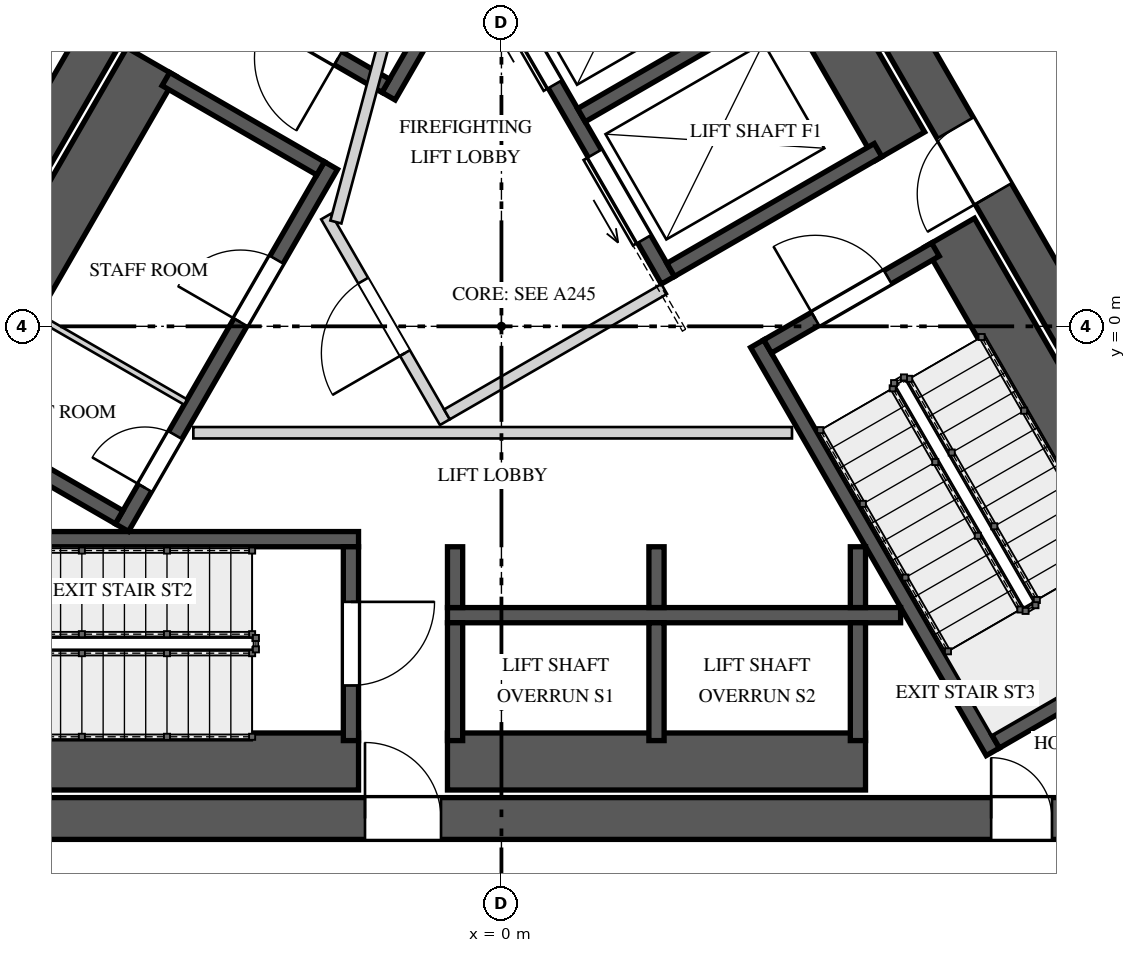
"""IFC4 building model, lengths in metres.
Left out: names, types, materials, properties, quantities, classifications, styles, units other than length and angle.
Written with IfcOpenShell. Run it as: python <this file> out.ifc"""

import sys

from ifc_helpers import new_model, si_unit, direction, frame, frame_2d, origin, place, context, subcontext, project, spatial, rectangle, extrude, element, fill, save


model = new_model("IFC4")
c1 = context("Model", 3, precision=1e-05, world=origin(), true_north=direction((0.0, 1.0)))
c2 = subcontext(c1, "Body", "Model", "MODEL_VIEW")
j1 = project(units=[si_unit("LENGTHUNIT", "METRE"), si_unit("PLANEANGLEUNIT", "RADIAN")], contexts=[c1])
p1 = place(None, origin())
s1 = spatial("IfcSite", under=j1, at=p1, CompositionType="ELEMENT")
p2 = place(p1, origin())
s2 = spatial("IfcBuilding", under=s1, at=p2, CompositionType="ELEMENT")
p3 = place(p2, frame((0.0, 0.0, 352.4)))
s3 = spatial("IfcBuildingStorey", under=s2, at=p3, CompositionType="ELEMENT", Elevation=352.4)
p4 = place(p3, frame((-1.285, 10.725, 0.0), z_axis=(0.0, 0.0, 1.0), x_axis=(-0.499994590896, -0.86602852671, 0.0)))
e1 = element("IfcWall", 1, at=p4, inside=s3, PredefinedType="SHEAR", context=c2, shape_type="SweptSolid", body=[
    extrude(rectangle(XDim=17.292, YDim=0.55, at=frame_2d((8.646, 0.0))), origin(), (0.0, 0.0, 1.0), 4.5),
])
p5 = place(p4, frame((6.851, 0.0, 0.0)))
e2 = element("IfcOpeningElement", 2, at=p5, cuts=e1, PredefinedType="OPENING", context=c2, shape_type="SweptSolid", body=[
    extrude(rectangle(XDim=1.0, YDim=2.4, at=frame_2d((0.5, 1.2))), frame((0.0, 0.285, 0.0), z_axis=(0.0, -1.0, 0.0), x_axis=(1.0, 0.0, 0.0)), (0.0, 0.0, 1.0), 0.57),
])
p6 = place(p3, frame((-8.646, -6.475, 0.0), z_axis=(0.0, 0.0, 1.0), x_axis=(1.0, 0.0, 0.0)))
e3 = element("IfcWall", 3, at=p6, inside=s3, PredefinedType="SHEAR", context=c2, shape_type="SweptSolid", body=[
    extrude(rectangle(XDim=17.292, YDim=0.55, at=frame_2d((8.646, 0.0))), origin(), (0.0, 0.0, 1.0), 4.5),
])
p7 = place(p6, frame((6.851, 0.0, 0.0)))
e4 = element("IfcOpeningElement", 4, at=p7, cuts=e3, PredefinedType="OPENING", context=c2, shape_type="SweptSolid", body=[
    extrude(rectangle(XDim=1.0, YDim=2.4, at=frame_2d((0.5, 1.2))), frame((0.0, 0.285, 0.0), z_axis=(0.0, -1.0, 0.0), x_axis=(1.0, 0.0, 0.0)), (0.0, 0.0, 1.0), 0.57),
])
p8 = place(p6, frame((15.089, 0.0, 0.0)))
e5 = element("IfcOpeningElement", 5, at=p8, cuts=e3, PredefinedType="OPENING", context=c2, shape_type="SweptSolid", body=[
    extrude(rectangle(XDim=0.8, YDim=2.1, at=frame_2d((0.4, 1.05))), frame((0.0, 0.285, 0.0), z_axis=(0.0, -1.0, 0.0), x_axis=(1.0, 0.0, 0.0)), (0.0, 0.0, 1.0), 0.57),
])
p9 = place(p3, frame((9.93, -4.25, 0.0), z_axis=(0.0, 0.0, 1.0), x_axis=(-0.499994590896, 0.86602852671, 0.0)))
e6 = element("IfcWall", 6, at=p9, inside=s3, PredefinedType="SHEAR", context=c2, shape_type="SweptSolid", body=[
    extrude(rectangle(XDim=17.292, YDim=0.55, at=frame_2d((8.646, 0.0))), origin(), (0.0, 0.0, 1.0), 4.5),
])
p10 = place(p9, frame((6.921, 0.0, 0.0)))
e7 = element("IfcOpeningElement", 7, at=p10, cuts=e6, PredefinedType="OPENING", context=c2, shape_type="SweptSolid", body=[
    extrude(rectangle(XDim=1.0, YDim=2.4, at=frame_2d((0.5, 1.2))), frame((0.0, 0.285, 0.0), z_axis=(0.0, -1.0, 0.0), x_axis=(1.0, 0.0, 0.0)), (0.0, 0.0, 1.0), 0.57),
])
p11 = place(p9, frame((14.626, 0.0, 0.0)))
e8 = element("IfcOpeningElement", 8, at=p11, cuts=e6, PredefinedType="OPENING", context=c2, shape_type="SweptSolid", body=[
    extrude(rectangle(XDim=0.8, YDim=2.1, at=frame_2d((0.4, 1.05))), frame((0.0, 0.285, 0.0), z_axis=(0.0, -1.0, 0.0), x_axis=(1.0, 0.0, 0.0)), (0.0, 0.0, 1.0), 0.57),
])
p12 = place(p3, frame((1.615, 8.397, 0.0), z_axis=(0.0, 0.0, 1.0), x_axis=(-0.500009909098, -0.866019682689, 0.0)))
e9 = element("IfcWall", 9, at=p12, inside=s3, PredefinedType="SOLIDWALL", context=c2, shape_type="SweptSolid", body=[
    extrude(rectangle(XDim=6.2, YDim=0.2, at=frame_2d((3.1, 0.0))), origin(), (0.0, 0.0, 1.0), 4.15),
])
p13 = place(p3, frame((-1.521, 3.165, 0.0), z_axis=(0.0, 0.0, 1.0), x_axis=(-0.866030925526, 0.499990435942, 0.0)))
e10 = element("IfcWall", 10, at=p13, inside=s3, PredefinedType="SOLIDWALL", context=c2, shape_type="SweptSolid", body=[
    extrude(rectangle(XDim=2.55, YDim=0.2, at=frame_2d((1.275, 0.0))), origin(), (0.0, 0.0, 1.0), 4.15),
])
p14 = place(p13, frame((0.725, 0.0, 0.0)))
e11 = element("IfcOpeningElement", 11, at=p14, cuts=e10, PredefinedType="OPENING", context=c2, shape_type="SweptSolid", body=[
    extrude(rectangle(XDim=1.1, YDim=2.4, at=frame_2d((0.55, 1.2))), frame((0.0, 0.11, 0.0), z_axis=(0.0, -1.0, 0.0), x_axis=(1.0, 0.0, 0.0)), (0.0, 0.0, 1.0), 0.22),
])
p15 = place(p3, frame((-8.08, -5.725, 0.0), z_axis=(0.0, 0.0, 1.0), x_axis=(1.0, 0.0, 0.0)))
e12 = element("IfcWall", 12, at=p15, inside=s3, PredefinedType="SOLIDWALL", context=c2, shape_type="SweptSolid", body=[
    extrude(rectangle(XDim=6.2, YDim=0.75, at=frame_2d((3.1, 0.0))), origin(), (0.0, 0.0, 1.0), 4.15),
])
p16 = place(p3, frame((-8.08, -2.8, 0.0), z_axis=(0.0, 0.0, 1.0), x_axis=(1.0, 0.0, 0.0)))
e13 = element("IfcWall", 13, at=p16, inside=s3, PredefinedType="SOLIDWALL", context=c2, shape_type="SweptSolid", body=[
    extrude(rectangle(XDim=6.2, YDim=0.2, at=frame_2d((3.1, 0.0))), origin(), (0.0, 0.0, 1.0), 4.15),
])
p17 = place(p3, frame((-1.98, -2.9, 0.0), z_axis=(0.0, 0.0, 1.0), x_axis=(0.0, -1.0, 0.0)))
e14 = element("IfcWall", 14, at=p17, inside=s3, PredefinedType="SOLIDWALL", context=c2, shape_type="SweptSolid", body=[
    extrude(rectangle(XDim=2.55, YDim=0.2, at=frame_2d((1.275, 0.0))), origin(), (0.0, 0.0, 1.0), 4.15),
])
p18 = place(p17, frame((0.725, 0.0, 0.0)))
e15 = element("IfcOpeningElement", 15, at=p18, cuts=e14, PredefinedType="OPENING", context=c2, shape_type="SweptSolid", body=[
    extrude(rectangle(XDim=1.1, YDim=2.4, at=frame_2d((0.55, 1.2))), frame((0.0, 0.11, 0.0), z_axis=(0.0, -1.0, 0.0), x_axis=(1.0, 0.0, 0.0)), (0.0, 0.0, 1.0), 0.22),
])
p19 = place(p3, frame((8.998, -4.135, 0.0), z_axis=(0.0, 0.0, 1.0), x_axis=(-0.500009909098, 0.866019682689, 0.0)))
e16 = element("IfcWall", 16, at=p19, inside=s3, PredefinedType="SOLIDWALL", context=c2, shape_type="SweptSolid", body=[
    extrude(rectangle(XDim=6.2, YDim=0.75, at=frame_2d((3.1, 0.0))), origin(), (0.0, 0.0, 1.0), 4.15),
])
p20 = place(p3, frame((6.465, -5.597, 0.0), z_axis=(0.0, 0.0, 1.0), x_axis=(-0.49998037582, 0.866036733513, 0.0)))
e17 = element("IfcWall", 17, at=p20, inside=s3, PredefinedType="SOLIDWALL", context=c2, shape_type="SweptSolid", body=[
    extrude(rectangle(XDim=6.2, YDim=0.2, at=frame_2d((3.1, 0.0))), origin(), (0.0, 0.0, 1.0), 4.15),
])
p21 = place(p3, frame((6.501, -5.461, 0.0), z_axis=(0.0, 0.0, 1.0), x_axis=(0.865989465428, 0.500062241894, 0.0)))
e18 = element("IfcWall", 18, at=p21, inside=s3, PredefinedType="SOLIDWALL", context=c2, shape_type="SweptSolid", body=[
    extrude(rectangle(XDim=2.55, YDim=0.2, at=frame_2d((1.275, 0.0))), origin(), (0.0, 0.0, 1.0), 4.15),
])
p22 = place(p3, frame((3.501, -0.265, 0.0), z_axis=(0.0, 0.0, 1.0), x_axis=(0.866030925526, 0.499990435942, 0.0)))
e19 = element("IfcWall", 19, at=p22, inside=s3, PredefinedType="SOLIDWALL", context=c2, shape_type="SweptSolid", body=[
    extrude(rectangle(XDim=2.55, YDim=0.2, at=frame_2d((1.275, 0.0))), origin(), (0.0, 0.0, 1.0), 4.15),
])
p23 = place(p22, frame((0.725, 0.0, 0.0)))
e20 = element("IfcOpeningElement", 20, at=p23, cuts=e19, PredefinedType="OPENING", context=c2, shape_type="SweptSolid", body=[
    extrude(rectangle(XDim=1.1, YDim=2.4, at=frame_2d((0.55, 1.2))), frame((0.0, 0.11, 0.0), z_axis=(0.0, -1.0, 0.0), x_axis=(1.0, 0.0, 0.0)), (0.0, 0.0, 1.0), 0.22),
])
p24 = place(p3, frame((-4.993, -2.648, 0.0), z_axis=(0.0, 0.0, 1.0), x_axis=(0.499996545922, 0.866027397988, 0.0)))
e21 = element("IfcWall", 21, at=p24, inside=s3, PredefinedType="SOLIDWALL", context=c2, shape_type="SweptSolid", body=[
    extrude(rectangle(XDim=5.5, YDim=0.2, at=frame_2d((2.75, 0.0))), origin(), (0.0, 0.0, 1.0), 4.15),
])
p25 = place(p24, frame((3.12, 0.0, 0.0)))
e22 = element("IfcOpeningElement", 22, at=p25, cuts=e21, PredefinedType="OPENING", context=c2, shape_type="SweptSolid", body=[
    extrude(rectangle(XDim=0.95, YDim=2.4, at=frame_2d((0.475, 1.2))), frame((0.0, 0.11, 0.0), z_axis=(0.0, -1.0, 0.0), x_axis=(1.0, 0.0, 0.0)), (0.0, 0.0, 1.0), 0.22),
])
p26 = place(p24, frame((0.605, 0.0, 0.0)))
e23 = element("IfcOpeningElement", 23, at=p26, cuts=e21, PredefinedType="OPENING", context=c2, shape_type="SweptSolid", body=[
    extrude(rectangle(XDim=0.8, YDim=2.1, at=frame_2d((0.4, 1.05))), frame((0.0, 0.11, 0.0), z_axis=(0.0, -1.0, 0.0), x_axis=(1.0, 0.0, 0.0)), (0.0, 0.0, 1.0), 0.22),
])
p27 = place(p3, frame((-4.603, 3.477, 0.0), z_axis=(0.0, 0.0, 1.0), x_axis=(-0.500015767406, -0.866016300277, 0.0)))
e24 = element("IfcWall", 24, at=p27, inside=s3, PredefinedType="SOLIDWALL", context=c2, shape_type="SweptSolid", body=[
    extrude(rectangle(XDim=5.5, YDim=0.75, at=frame_2d((2.75, 0.0))), origin(), (0.0, 0.0, 1.0), 4.15),
])
p28 = place(p3, frame((-2.38, 2.078, 0.0), z_axis=(0.0, 0.0, 1.0), x_axis=(-0.866061024631, 0.499938297808, 0.0)))
e25 = element("IfcWall", 25, at=p28, inside=s3, PredefinedType="SOLIDWALL", context=c2, shape_type="SweptSolid", body=[
    extrude(rectangle(XDim=2.35, YDim=0.2, at=frame_2d((1.175, 0.0))), origin(), (0.0, 0.0, 1.0), 4.15),
])
p29 = place(p3, frame((-5.03, -2.512, 0.0), z_axis=(0.0, 0.0, 1.0), x_axis=(-0.866016039709, 0.500016218704, 0.0)))
e26 = element("IfcWall", 26, at=p29, inside=s3, PredefinedType="SOLIDWALL", context=c2, shape_type="SweptSolid", body=[
    extrude(rectangle(XDim=2.35, YDim=0.2, at=frame_2d((1.175, 0.0))), origin(), (0.0, 0.0, 1.0), 4.15),
])
p30 = place(p3, frame((-4.155, -0.996, 0.0), z_axis=(0.0, 0.0, 1.0), x_axis=(-0.866016039709, 0.500016218704, 0.0)))
e27 = element("IfcWall", 27, at=p30, inside=s3, PredefinedType="PARTITIONING", context=c2, shape_type="SweptSolid", body=[
    extrude(rectangle(XDim=2.35, YDim=0.08, at=frame_2d((1.175, 0.0))), origin(), (0.0, 0.0, 1.0), 4.15),
])
p31 = place(p3, frame((-0.71, -3.8, 0.0), z_axis=(0.0, 0.0, 1.0), x_axis=(1.0, 0.0, 0.0)))
e28 = element("IfcWall", 28, at=p31, inside=s3, PredefinedType="SOLIDWALL", context=c2, shape_type="SweptSolid", body=[
    extrude(rectangle(XDim=5.961, YDim=0.2, at=frame_2d((2.981, 0.0))), origin(), (0.0, 0.0, 1.0), 4.15),
])
p32 = place(p3, frame((-0.71, -5.725, 0.0), z_axis=(0.0, 0.0, 1.0), x_axis=(1.0, 0.0, 0.0)))
e29 = element("IfcWall", 29, at=p32, inside=s3, PredefinedType="SOLIDWALL", context=c2, shape_type="SweptSolid", body=[
    extrude(rectangle(XDim=5.5, YDim=0.75, at=frame_2d((2.75, 0.0))), origin(), (0.0, 0.0, 1.0), 4.15),
])
p33 = place(p3, frame((-0.61, -3.9, 0.0), z_axis=(0.0, 0.0, 1.0), x_axis=(0.0, -1.0, 0.0)))
e30 = element("IfcWall", 30, at=p33, inside=s3, PredefinedType="SOLIDWALL", context=c2, shape_type="SweptSolid", body=[
    extrude(rectangle(XDim=1.55, YDim=0.2, at=frame_2d((0.775, 0.0))), origin(), (0.0, 0.0, 1.0), 4.15),
])
p34 = place(p3, frame((-0.61, -2.9, 0.0), z_axis=(0.0, 0.0, 1.0), x_axis=(0.0, -1.0, 0.0)))
e31 = element("IfcWall", 31, at=p34, inside=s3, PredefinedType="SOLIDWALL", context=c2, shape_type="SweptSolid", body=[
    extrude(rectangle(XDim=0.8, YDim=0.2, at=frame_2d((0.4, 0.0))), origin(), (0.0, 0.0, 1.0), 4.15),
])
p35 = place(p3, frame((2.04, -3.9, 0.0), z_axis=(0.0, 0.0, 1.0), x_axis=(0.0, -1.0, 0.0)))
e32 = element("IfcWall", 32, at=p35, inside=s3, PredefinedType="SOLIDWALL", context=c2, shape_type="SweptSolid", body=[
    extrude(rectangle(XDim=1.55, YDim=0.2, at=frame_2d((0.775, 0.0))), origin(), (0.0, 0.0, 1.0), 4.15),
])
p36 = place(p3, frame((2.04, -2.9, 0.0), z_axis=(0.0, 0.0, 1.0), x_axis=(0.0, -1.0, 0.0)))
e33 = element("IfcWall", 33, at=p36, inside=s3, PredefinedType="SOLIDWALL", context=c2, shape_type="SweptSolid", body=[
    extrude(rectangle(XDim=0.8, YDim=0.2, at=frame_2d((0.4, 0.0))), origin(), (0.0, 0.0, 1.0), 4.15),
])
p37 = place(p3, frame((4.69, -3.9, 0.0), z_axis=(0.0, 0.0, 1.0), x_axis=(0.0, -1.0, 0.0)))
e34 = element("IfcWall", 34, at=p37, inside=s3, PredefinedType="SOLIDWALL", context=c2, shape_type="SweptSolid", body=[
    extrude(rectangle(XDim=1.55, YDim=0.2, at=frame_2d((0.775, 0.0))), origin(), (0.0, 0.0, 1.0), 4.15),
])
p38 = place(p3, frame((4.69, -2.9, 0.0), z_axis=(0.0, 0.0, 1.0), x_axis=(0.0, -1.0, 0.0)))
e35 = element("IfcWall", 35, at=p38, inside=s3, PredefinedType="SOLIDWALL", context=c2, shape_type="SweptSolid", body=[
    extrude(rectangle(XDim=0.8, YDim=0.2, at=frame_2d((0.4, 0.0))), origin(), (0.0, 0.0, 1.0), 4.15),
])
p39 = place(p3, frame((2.19, 0.606, 0.0), z_axis=(0.0, 0.0, 1.0), x_axis=(-0.500002801628, 0.866023786258, 0.0)))
e36 = element("IfcWall", 36, at=p39, inside=s3, PredefinedType="SOLIDWALL", context=c2, shape_type="SweptSolid", body=[
    extrude(rectangle(XDim=4.9, YDim=0.2, at=frame_2d((2.45, 0.0))), origin(), (0.0, 0.0, 1.0), 4.15),
])
p40 = place(p39, frame((0.625, 0.0, 0.0)))
e37 = element("IfcOpeningElement", 37, at=p40, cuts=e36, PredefinedType="OPENING", context=c2, shape_type="SweptSolid", body=[
    extrude(rectangle(XDim=1.3, YDim=2.1, at=frame_2d((0.65, 1.05))), frame((0.0, 0.11, 0.0), z_axis=(0.0, -1.0, 0.0), x_axis=(1.0, 0.0, 0.0)), (0.0, 0.0, 1.0), 0.22),
])
p41 = place(p39, frame((2.975, 0.0, 0.0)))
e38 = element("IfcOpeningElement", 38, at=p41, cuts=e36, PredefinedType="OPENING", context=c2, shape_type="SweptSolid", body=[
    extrude(rectangle(XDim=1.3, YDim=2.1, at=frame_2d((0.65, 1.05))), frame((0.0, 0.11, 0.0), z_axis=(0.0, -1.0, 0.0), x_axis=(1.0, 0.0, 0.0)), (0.0, 0.0, 1.0), 0.22),
])
p42 = place(p3, frame((5.243, 2.369, 0.0), z_axis=(0.0, 0.0, 1.0), x_axis=(-0.500002801628, 0.866023786258, 0.0)))
e39 = element("IfcWall", 39, at=p42, inside=s3, PredefinedType="SOLIDWALL", context=c2, shape_type="SweptSolid", body=[
    extrude(rectangle(XDim=4.9, YDim=0.75, at=frame_2d((2.45, 0.0))), origin(), (0.0, 0.0, 1.0), 4.15),
])
for number, where, z_axis, x_axis in (
    (40, (2.227, 0.743, 0.0), (0.0, 0.0, 1.0), (0.866, 0.5, 0.0)),
    (41, (1.052, 2.778, 0.0), (0.0, 0.0, 1.0), (0.866, 0.5, 0.0)),
):
    element("IfcWall", number, at=place(p3, frame(where, z_axis=z_axis, x_axis=x_axis)), inside=s3, PredefinedType="SOLIDWALL", context=c2, shape_type="SweptSolid", body=[
        extrude(rectangle(XDim=3.15, YDim=0.2, at=frame_2d((1.575, 0.0))), origin(), (0.0, 0.0, 1.0), 4.15),
    ])
p43 = place(p3, frame((-0.744, -1.261, 0.0), z_axis=(0.0, 0.0, 1.0), x_axis=(-0.500004234368, 0.866022959057, 0.0)))
e42 = element("IfcWall", 42, at=p43, inside=s3, PredefinedType="PARTITIONING", context=c2, shape_type="SweptSolid", body=[
    extrude(rectangle(XDim=3.125, YDim=0.15, at=frame_2d((1.562, 0.0))), origin(), (0.0, 0.0, 1.0), 4.15),
])
p44 = place(p43, frame((1.05, 0.0, 0.0)))
e43 = element("IfcOpeningElement", 43, at=p44, cuts=e42, PredefinedType="OPENING", context=c2, shape_type="SweptSolid", body=[
    extrude(rectangle(XDim=1.1, YDim=2.4, at=frame_2d((0.55, 1.2))), frame((0.0, 0.085, 0.0), z_axis=(0.0, -1.0, 0.0), x_axis=(1.0, 0.0, 0.0)), (0.0, 0.0, 1.0), 0.17),
])
p45 = place(p3, frame((-0.717, -1.159, 0.0), z_axis=(0.0, 0.0, 1.0), x_axis=(0.866008176907, 0.50002983664, 0.0)))
e44 = element("IfcWall", 44, at=p45, inside=s3, PredefinedType="PARTITIONING", context=c2, shape_type="SweptSolid", body=[
    extrude(rectangle(XDim=3.3, YDim=0.15, at=frame_2d((1.65, 0.0))), origin(), (0.0, 0.0, 1.0), 4.15),
])
p46 = place(p3, frame((-2.178, 1.372, 0.0), z_axis=(0.0, 0.0, 1.0), x_axis=(0.258808958833, 0.96592852884, 0.0)))
e45 = element("IfcWall", 45, at=p46, inside=s3, PredefinedType="PARTITIONING", context=c2, shape_type="SweptSolid", body=[
    extrude(rectangle(XDim=2.903, YDim=0.15, at=frame_2d((1.451, 0.0))), origin(), (0.0, 0.0, 1.0), 4.15),
])
p47 = place(p3, frame((-4.053, -1.4, 0.0), z_axis=(0.0, 0.0, 1.0), x_axis=(1.0, 0.0, 0.0)))
e46 = element("IfcWall", 46, at=p47, inside=s3, PredefinedType="PARTITIONING", context=c2, shape_type="SweptSolid", body=[
    extrude(rectangle(XDim=7.876, YDim=0.15, at=frame_2d((3.938, 0.0))), origin(), (0.0, 0.0, 1.0), 4.15),
])
p48 = place(p3, frame((7.146, 4.722, 0.0), z_axis=(0.0, 0.0, 1.0), x_axis=(0.499955681623, -0.866050989499, 0.0)))
e47 = element("IfcWall", 47, at=p48, inside=s3, PredefinedType="SOLIDWALL", context=c2, shape_type="SweptSolid", body=[
    extrude(rectangle(XDim=1.238, YDim=0.2, at=frame_2d((0.619, 0.0))), origin(), (0.0, 0.0, 1.0), 4.15),
])
p49 = place(p14, origin())
e48 = element("IfcDoor", 48, at=p49, inside=s3, OperationType="SINGLE_SWING_RIGHT", PredefinedType="DOOR", context=c2, shape_type="SweptSolid", body=[
    extrude(rectangle(XDim=1.1, YDim=2.4, at=frame_2d((0.55, 1.2))), frame((0.0, 0.025, 0.0), z_axis=(0.0, -1.0, 0.0), x_axis=(1.0, 0.0, 0.0)), (0.0, 0.0, 1.0), 0.05),
])
fill(e11, e48)
p50 = place(p18, origin())
e49 = element("IfcDoor", 49, at=p50, inside=s3, OperationType="SINGLE_SWING_LEFT", PredefinedType="DOOR", context=c2, shape_type="SweptSolid", body=[
    extrude(rectangle(XDim=1.1, YDim=2.4, at=frame_2d((0.55, 1.2))), frame((0.0, 0.025, 0.0), z_axis=(0.0, -1.0, 0.0), x_axis=(1.0, 0.0, 0.0)), (0.0, 0.0, 1.0), 0.05),
])
fill(e15, e49)
p51 = place(p23, origin())
e50 = element("IfcDoor", 50, at=p51, inside=s3, OperationType="SINGLE_SWING_RIGHT", PredefinedType="DOOR", context=c2, shape_type="SweptSolid", body=[
    extrude(rectangle(XDim=1.1, YDim=2.4, at=frame_2d((0.55, 1.2))), frame((0.0, 0.025, 0.0), z_axis=(0.0, -1.0, 0.0), x_axis=(1.0, 0.0, 0.0)), (0.0, 0.0, 1.0), 0.05),
])
fill(e20, e50)
p52 = place(p25, origin())
e51 = element("IfcDoor", 51, at=p52, inside=s3, OperationType="SINGLE_SWING_LEFT", PredefinedType="DOOR", context=c2, shape_type="SweptSolid", body=[
    extrude(rectangle(XDim=0.95, YDim=2.4, at=frame_2d((0.475, 1.2))), frame((0.0, 0.025, 0.0), z_axis=(0.0, -1.0, 0.0), x_axis=(1.0, 0.0, 0.0)), (0.0, 0.0, 1.0), 0.05),
])
fill(e22, e51)
p53 = place(p26, origin())
e52 = element("IfcDoor", 52, at=p53, inside=s3, OperationType="SINGLE_SWING_RIGHT", PredefinedType="DOOR", context=c2, shape_type="SweptSolid", body=[
    extrude(rectangle(XDim=0.8, YDim=2.1, at=frame_2d((0.4, 1.05))), frame((0.0, 0.025, 0.0), z_axis=(0.0, -1.0, 0.0), x_axis=(1.0, 0.0, 0.0)), (0.0, 0.0, 1.0), 0.05),
])
fill(e23, e52)
p54 = place(p40, origin())
e53 = element("IfcDoor", 53, at=p54, inside=s3, OperationType="SLIDING_TO_LEFT", PredefinedType="DOOR", context=c2, shape_type="SweptSolid", body=[
    extrude(rectangle(XDim=1.3, YDim=2.1, at=frame_2d((0.65, 1.05))), frame((0.0, 0.025, 0.0), z_axis=(0.0, -1.0, 0.0), x_axis=(1.0, 0.0, 0.0)), (0.0, 0.0, 1.0), 0.05),
])
fill(e37, e53)
p55 = place(p41, origin())
e54 = element("IfcDoor", 54, at=p55, inside=s3, OperationType="SLIDING_TO_RIGHT", PredefinedType="DOOR", context=c2, shape_type="SweptSolid", body=[
    extrude(rectangle(XDim=1.3, YDim=2.1, at=frame_2d((0.65, 1.05))), frame((0.0, 0.025, 0.0), z_axis=(0.0, -1.0, 0.0), x_axis=(1.0, 0.0, 0.0)), (0.0, 0.0, 1.0), 0.05),
])
fill(e38, e54)
p56 = place(p44, origin())
e55 = element("IfcDoor", 55, at=p56, inside=s3, OperationType="SINGLE_SWING_LEFT", PredefinedType="DOOR", context=c2, shape_type="SweptSolid", body=[
    extrude(rectangle(XDim=1.1, YDim=2.4, at=frame_2d((0.55, 1.2))), frame((0.0, 0.025, 0.0), z_axis=(0.0, -1.0, 0.0), x_axis=(1.0, 0.0, 0.0)), (0.0, 0.0, 1.0), 0.05),
])
fill(e43, e55)
p57 = place(p7, origin())
e56 = element("IfcDoor", 56, at=p57, inside=s3, OperationType="SINGLE_SWING_LEFT", PredefinedType="DOOR", context=c2, shape_type="SweptSolid", body=[
    extrude(rectangle(XDim=1.0, YDim=2.4, at=frame_2d((0.5, 1.2))), frame((0.0, 0.025, 0.0), z_axis=(0.0, -1.0, 0.0), x_axis=(1.0, 0.0, 0.0)), (0.0, 0.0, 1.0), 0.05),
])
fill(e4, e56)
p58 = place(p10, origin())
e57 = element("IfcDoor", 57, at=p58, inside=s3, OperationType="SINGLE_SWING_RIGHT", PredefinedType="DOOR", context=c2, shape_type="SweptSolid", body=[
    extrude(rectangle(XDim=1.0, YDim=2.4, at=frame_2d((0.5, 1.2))), frame((0.0, 0.025, 0.0), z_axis=(0.0, -1.0, 0.0), x_axis=(1.0, 0.0, 0.0)), (0.0, 0.0, 1.0), 0.05),
])
fill(e7, e57)
p59 = place(p8, origin())
e58 = element("IfcDoor", 58, at=p59, inside=s3, OperationType="SINGLE_SWING_LEFT", PredefinedType="DOOR", context=c2, shape_type="SweptSolid", body=[
    extrude(rectangle(XDim=0.8, YDim=2.1, at=frame_2d((0.4, 1.05))), frame((0.0, 0.025, 0.0), z_axis=(0.0, -1.0, 0.0), x_axis=(1.0, 0.0, 0.0)), (0.0, 0.0, 1.0), 0.05),
])
fill(e5, e58)
save(model, sys.argv[1])
